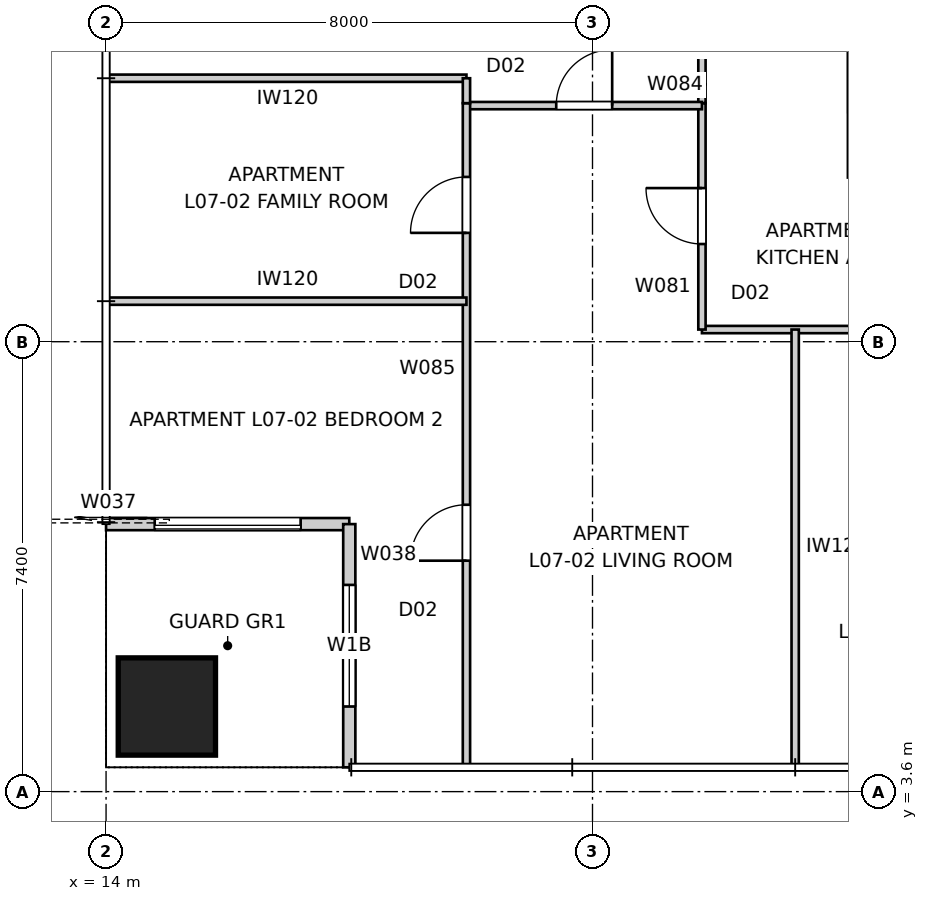
"""IFC4 building model, lengths in metres.
Left out: names, types, materials, properties, quantities, classifications, styles, units other than length and angle.
Written with IfcOpenShell. Run it as: python <this file> out.ifc"""

import sys

from ifc_helpers import new_model, si_unit, direction, frame, frame_2d, origin, origin_2d, place, context, subcontext, project, spatial, rectangle, extrude, element, fill, save


model = new_model("IFC4")
c1 = context("Model", 3, precision=1e-05, world=origin(), true_north=direction((0.0, 1.0)))
c2 = subcontext(c1, "Body", "Model", "MODEL_VIEW")
j1 = project(units=[si_unit("LENGTHUNIT", "METRE"), si_unit("PLANEANGLEUNIT", "RADIAN")], contexts=[c1])
p1 = place(None, origin())
s1 = spatial("IfcSite", under=j1, at=p1, CompositionType="ELEMENT")
p2 = place(p1, origin())
s2 = spatial("IfcBuilding", under=s1, at=p2, CompositionType="ELEMENT")
p3 = place(p2, frame((0.0, 0.0, 28.6)))
s3 = spatial("IfcBuildingStorey", under=s2, at=p3, CompositionType="ELEMENT", Elevation=28.6)
p4 = place(p3, frame((15.0, 5.0, 0.0), z_axis=(0.0, 0.0, 1.0), x_axis=(1.0, 0.0, 0.0)))
e1 = element("IfcColumn", 1, at=p4, inside=s3, PredefinedType="COLUMN", context=c2, shape_type="SweptSolid", body=[
    extrude(rectangle(XDim=1.6, YDim=1.6, at=origin_2d()), origin(), (0.0, 0.0, 1.0), 3.4),
])
p5 = place(p3, frame((14.0, 8.0, 0.0), z_axis=(0.0, 0.0, 1.0), x_axis=(1.0, 0.0, 0.0)))
e2 = element("IfcWall", 2, at=p5, inside=s3, PredefinedType="SOLIDWALL", context=c2, shape_type="SweptSolid", body=[
    extrude(rectangle(XDim=4.0, YDim=0.2, at=frame_2d((2.0, 0.0))), origin(), (0.0, 0.0, 1.0), 3.25),
])
p6 = place(p5, frame((0.8, 0.0, 0.0)))
e3 = element("IfcOpeningElement", 3, at=p6, cuts=e2, PredefinedType="OPENING", context=c2, shape_type="SweptSolid", body=[
    extrude(rectangle(XDim=2.4, YDim=2.1, at=frame_2d((1.2, 1.05))), frame((0.0, 0.11, 0.0), z_axis=(0.0, -1.0, 0.0), x_axis=(1.0, 0.0, 0.0)), (0.0, 0.0, 1.0), 0.22),
])
p7 = place(p3, frame((18.0, 8.0, 0.0), z_axis=(0.0, 0.0, 1.0), x_axis=(0.0, -1.0, 0.0)))
e4 = element("IfcWall", 4, at=p7, inside=s3, PredefinedType="SOLIDWALL", context=c2, shape_type="SweptSolid", body=[
    extrude(rectangle(XDim=4.0, YDim=0.2, at=frame_2d((2.0, 0.0))), origin(), (0.0, 0.0, 1.0), 3.25),
])
p8 = place(p7, frame((1.0, 0.0, 0.45)))
e5 = element("IfcOpeningElement", 5, at=p8, cuts=e4, PredefinedType="OPENING", context=c2, shape_type="SweptSolid", body=[
    extrude(rectangle(XDim=2.0, YDim=1.8, at=frame_2d((1.0, 0.9))), frame((0.0, 0.11, 0.0), z_axis=(0.0, -1.0, 0.0), x_axis=(1.0, 0.0, 0.0)), (0.0, 0.0, 1.0), 0.22),
])
p9 = place(p3, frame((26.3, 46.3, 0.0), z_axis=(0.0, 0.0, 1.0), x_axis=(0.0, -1.0, 0.0)))
e6 = element("IfcWall", 6, at=p9, inside=s3, PredefinedType="PARTITIONING", context=c2, shape_type="SweptSolid", body=[
    extrude(rectangle(XDim=32.6, YDim=0.2, at=frame_2d((16.3, 0.0))), origin(), (0.0, 0.0, 1.0), 3.25),
])
p10 = place(p9, frame((2.315, 0.0, 0.0)))
e7 = element("IfcOpeningElement", 7, at=p10, cuts=e6, PredefinedType="OPENING", context=c2, shape_type="SweptSolid", body=[
    extrude(rectangle(XDim=1.02, YDim=2.34, at=frame_2d((0.51, 1.17))), frame((0.0, 0.11, 0.0), z_axis=(0.0, -1.0, 0.0), x_axis=(1.0, 0.0, 0.0)), (0.0, 0.0, 1.0), 0.22),
])
p11 = place(p9, frame((10.624, 0.0, 0.0)))
e8 = element("IfcOpeningElement", 8, at=p11, cuts=e6, PredefinedType="OPENING", context=c2, shape_type="SweptSolid", body=[
    extrude(rectangle(XDim=1.02, YDim=2.34, at=frame_2d((0.51, 1.17))), frame((0.0, 0.11, 0.0), z_axis=(0.0, -1.0, 0.0), x_axis=(1.0, 0.0, 0.0)), (0.0, 0.0, 1.0), 0.22),
])
p12 = place(p9, frame((17.848, 0.0, 0.0)))
e9 = element("IfcOpeningElement", 9, at=p12, cuts=e6, PredefinedType="OPENING", context=c2, shape_type="SweptSolid", body=[
    extrude(rectangle(XDim=1.02, YDim=2.34, at=frame_2d((0.51, 1.17))), frame((0.0, 0.11, 0.0), z_axis=(0.0, -1.0, 0.0), x_axis=(1.0, 0.0, 0.0)), (0.0, 0.0, 1.0), 0.22),
])
p13 = place(p9, frame((30.516, 0.0, 0.0)))
e10 = element("IfcOpeningElement", 10, at=p13, cuts=e6, PredefinedType="OPENING", context=c2, shape_type="SweptSolid", body=[
    extrude(rectangle(XDim=1.02, YDim=2.34, at=frame_2d((0.51, 1.17))), frame((0.0, 0.11, 0.0), z_axis=(0.0, -1.0, 0.0), x_axis=(1.0, 0.0, 0.0)), (0.0, 0.0, 1.0), 0.22),
])
p14 = place(p3, frame((56.2, 11.2, 0.0), z_axis=(0.0, 0.0, 1.0), x_axis=(-1.0, 0.0, 0.0)))
e11 = element("IfcWall", 11, at=p14, inside=s3, PredefinedType="PARTITIONING", context=c2, shape_type="SweptSolid", body=[
    extrude(rectangle(XDim=32.4, YDim=0.12, at=frame_2d((16.2, 0.0))), origin(), (0.0, 0.0, 1.0), 3.25),
])
p15 = place(p14, frame((24.882, 0.0, 0.0)))
e12 = element("IfcOpeningElement", 12, at=p15, cuts=e11, PredefinedType="OPENING", context=c2, shape_type="SweptSolid", body=[
    extrude(rectangle(XDim=0.92, YDim=2.34, at=frame_2d((0.46, 1.17))), frame((0.0, 0.07, 0.0), z_axis=(0.0, -1.0, 0.0), x_axis=(1.0, 0.0, 0.0)), (0.0, 0.0, 1.0), 0.14),
])
p16 = place(p14, frame((22.477, 0.0, 0.0)))
e13 = element("IfcOpeningElement", 13, at=p16, cuts=e11, PredefinedType="OPENING", context=c2, shape_type="SweptSolid", body=[
    extrude(rectangle(XDim=0.92, YDim=2.34, at=frame_2d((0.46, 1.17))), frame((0.0, 0.07, 0.0), z_axis=(0.0, -1.0, 0.0), x_axis=(1.0, 0.0, 0.0)), (0.0, 0.0, 1.0), 0.14),
])
p17 = place(p14, frame((6.598, 0.0, 0.0)))
e14 = element("IfcOpeningElement", 14, at=p17, cuts=e11, PredefinedType="OPENING", context=c2, shape_type="SweptSolid", body=[
    extrude(rectangle(XDim=0.92, YDim=2.34, at=frame_2d((0.46, 1.17))), frame((0.0, 0.07, 0.0), z_axis=(0.0, -1.0, 0.0), x_axis=(1.0, 0.0, 0.0)), (0.0, 0.0, 1.0), 0.14),
])
p18 = place(p14, frame((28.598, 0.0, 0.0)))
e15 = element("IfcOpeningElement", 15, at=p18, cuts=e11, PredefinedType="OPENING", context=c2, shape_type="SweptSolid", body=[
    extrude(rectangle(XDim=0.92, YDim=2.34, at=frame_2d((0.46, 1.17))), frame((0.0, 0.07, 0.0), z_axis=(0.0, -1.0, 0.0), x_axis=(1.0, 0.0, 0.0)), (0.0, 0.0, 1.0), 0.14),
])
p19 = place(p14, frame((2.862, 0.0, 0.0)))
e16 = element("IfcOpeningElement", 16, at=p19, cuts=e11, PredefinedType="OPENING", context=c2, shape_type="SweptSolid", body=[
    extrude(rectangle(XDim=0.96, YDim=2.1, at=frame_2d((0.48, 1.05))), frame((0.0, 0.07, 0.0), z_axis=(0.0, -1.0, 0.0), x_axis=(1.0, 0.0, 0.0)), (0.0, 0.0, 1.0), 0.14),
])
p20 = place(p14, frame((10.363, 0.0, 0.0)))
e17 = element("IfcOpeningElement", 17, at=p20, cuts=e11, PredefinedType="OPENING", context=c2, shape_type="SweptSolid", body=[
    extrude(rectangle(XDim=0.96, YDim=2.1, at=frame_2d((0.48, 1.05))), frame((0.0, 0.07, 0.0), z_axis=(0.0, -1.0, 0.0), x_axis=(1.0, 0.0, 0.0)), (0.0, 0.0, 1.0), 0.14),
])
p21 = place(p14, frame((13.862, 0.0, 0.0)))
e18 = element("IfcOpeningElement", 18, at=p21, cuts=e11, PredefinedType="OPENING", context=c2, shape_type="SweptSolid", body=[
    extrude(rectangle(XDim=0.96, YDim=2.1, at=frame_2d((0.48, 1.05))), frame((0.0, 0.07, 0.0), z_axis=(0.0, -1.0, 0.0), x_axis=(1.0, 0.0, 0.0)), (0.0, 0.0, 1.0), 0.14),
])
p22 = place(p14, frame((17.529, 0.0, 0.0)))
e19 = element("IfcOpeningElement", 19, at=p22, cuts=e11, PredefinedType="OPENING", context=c2, shape_type="SweptSolid", body=[
    extrude(rectangle(XDim=0.96, YDim=2.1, at=frame_2d((0.48, 1.05))), frame((0.0, 0.07, 0.0), z_axis=(0.0, -1.0, 0.0), x_axis=(1.0, 0.0, 0.0)), (0.0, 0.0, 1.0), 0.14),
])
p23 = place(p3, frame((23.8, 11.2, 0.0), z_axis=(0.0, 0.0, 1.0), x_axis=(0.0, 1.0, 0.0)))
e20 = element("IfcWall", 20, at=p23, inside=s3, PredefinedType="PARTITIONING", context=c2, shape_type="SweptSolid", body=[
    extrude(rectangle(XDim=3.723, YDim=0.12, at=frame_2d((1.862, 0.0))), origin(), (0.0, 0.0, 1.0), 3.25),
])
p24 = place(p23, frame((1.407, 0.0, 0.0)))
e21 = element("IfcOpeningElement", 21, at=p24, cuts=e20, PredefinedType="OPENING", context=c2, shape_type="SweptSolid", body=[
    extrude(rectangle(XDim=0.92, YDim=2.34, at=frame_2d((0.46, 1.17))), frame((0.0, 0.07, 0.0), z_axis=(0.0, -1.0, 0.0), x_axis=(1.0, 0.0, 0.0)), (0.0, 0.0, 1.0), 0.14),
])
p25 = place(p3, frame((23.8, 15.233, 0.0), z_axis=(0.0, 0.0, 1.0), x_axis=(0.0, 1.0, 0.0)))
e22 = element("IfcWall", 22, at=p25, inside=s3, PredefinedType="PARTITIONING", context=c2, shape_type="SweptSolid", body=[
    extrude(rectangle(XDim=3.767, YDim=0.12, at=frame_2d((1.883, 0.0))), origin(), (0.0, 0.0, 1.0), 3.25),
])
p26 = place(p3, frame((19.927, 14.883, 0.0), z_axis=(0.0, 0.0, 1.0), x_axis=(1.0, 0.0, 0.0)))
e23 = element("IfcWall", 23, at=p26, inside=s3, PredefinedType="PARTITIONING", context=c2, shape_type="SweptSolid", body=[
    extrude(rectangle(XDim=3.873, YDim=0.12, at=frame_2d((1.937, 0.0))), origin(), (0.0, 0.0, 1.0), 3.25),
])
p27 = place(p26, frame((1.477, 0.0, 0.0)))
e24 = element("IfcOpeningElement", 24, at=p27, cuts=e23, PredefinedType="OPENING", context=c2, shape_type="SweptSolid", body=[
    extrude(rectangle(XDim=0.92, YDim=2.34, at=frame_2d((0.46, 1.17))), frame((0.0, 0.07, 0.0), z_axis=(0.0, -1.0, 0.0), x_axis=(1.0, 0.0, 0.0)), (0.0, 0.0, 1.0), 0.14),
])
p28 = place(p3, frame((19.927, 4.04, 0.0), z_axis=(0.0, 0.0, 1.0), x_axis=(0.0, 1.0, 0.0)))
e25 = element("IfcWall", 25, at=p28, inside=s3, PredefinedType="PARTITIONING", context=c2, shape_type="SweptSolid", body=[
    extrude(rectangle(XDim=10.883, YDim=0.12, at=frame_2d((5.442, 0.0))), origin(), (0.0, 0.0, 1.0), 3.25),
])
p29 = place(p28, frame((3.358, 0.0, 0.0)))
e26 = element("IfcOpeningElement", 26, at=p29, cuts=e25, PredefinedType="OPENING", context=c2, shape_type="SweptSolid", body=[
    extrude(rectangle(XDim=0.92, YDim=2.34, at=frame_2d((0.46, 1.17))), frame((0.0, 0.07, 0.0), z_axis=(0.0, -1.0, 0.0), x_axis=(1.0, 0.0, 0.0)), (0.0, 0.0, 1.0), 0.14),
])
p30 = place(p28, frame((8.75, 0.0, 0.0)))
e27 = element("IfcOpeningElement", 27, at=p30, cuts=e25, PredefinedType="OPENING", context=c2, shape_type="SweptSolid", body=[
    extrude(rectangle(XDim=0.92, YDim=2.34, at=frame_2d((0.46, 1.17))), frame((0.0, 0.07, 0.0), z_axis=(0.0, -1.0, 0.0), x_axis=(1.0, 0.0, 0.0)), (0.0, 0.0, 1.0), 0.14),
])
p31 = place(p3, frame((25.333, 11.2, 0.0), z_axis=(0.0, 0.0, 1.0), x_axis=(0.0, -1.0, 0.0)))
e28 = element("IfcWall", 28, at=p31, inside=s3, PredefinedType="PARTITIONING", context=c2, shape_type="SweptSolid", body=[
    extrude(rectangle(XDim=7.16, YDim=0.12, at=frame_2d((3.58, 0.0))), origin(), (0.0, 0.0, 1.0), 2.638),
])
p32 = place(p3, frame((19.927, 15.333, 0.0), z_axis=(0.0, 0.0, 1.0), x_axis=(-1.0, 0.0, 0.0)))
e29 = element("IfcWall", 29, at=p32, inside=s3, PredefinedType="PARTITIONING", context=c2, shape_type="SweptSolid", body=[
    extrude(rectangle(XDim=5.887, YDim=0.12, at=frame_2d((2.943, 0.0))), origin(), (0.0, 0.0, 1.0), 2.638),
])
p33 = place(p3, frame((14.04, 11.667, 0.0), z_axis=(0.0, 0.0, 1.0), x_axis=(1.0, 0.0, 0.0)))
e30 = element("IfcWall", 30, at=p33, inside=s3, PredefinedType="PARTITIONING", context=c2, shape_type="SweptSolid", body=[
    extrude(rectangle(XDim=5.887, YDim=0.12, at=frame_2d((2.943, 0.0))), origin(), (0.0, 0.0, 1.0), 3.25),
])
p34 = place(p3, frame((23.8, 15.233, 0.0), z_axis=(0.0, 0.0, 1.0), x_axis=(0.0, -1.0, 0.0)))
e31 = element("IfcWall", 31, at=p34, inside=s3, PredefinedType="PARTITIONING", context=c2, shape_type="SweptSolid", body=[
    extrude(rectangle(XDim=0.31, YDim=0.12, at=frame_2d((0.155, 0.0))), origin(), (0.0, 0.0, 1.0), 3.25),
])
p35 = place(p3, frame((19.927, 15.333, 0.0), z_axis=(0.0, 0.0, 1.0), x_axis=(0.0, -1.0, 0.0)))
e32 = element("IfcWall", 32, at=p35, inside=s3, PredefinedType="PARTITIONING", context=c2, shape_type="SweptSolid", body=[
    extrude(rectangle(XDim=0.41, YDim=0.12, at=frame_2d((0.205, 0.0))), origin(), (0.0, 0.0, 1.0), 3.25),
])
p36 = place(p6, origin())
e33 = element("IfcDoor", 33, at=p36, inside=s3, OperationType="SLIDING_TO_LEFT", PredefinedType="DOOR", context=c2, shape_type="SweptSolid", body=[
    extrude(rectangle(XDim=2.4, YDim=2.1, at=frame_2d((1.2, 1.05))), frame((0.0, 0.025, 0.0), z_axis=(0.0, -1.0, 0.0), x_axis=(1.0, 0.0, 0.0)), (0.0, 0.0, 1.0), 0.05),
])
fill(e3, e33)
p37 = place(p8, origin())
e34 = element("IfcWindow", 34, at=p37, inside=s3, PartitioningType="SINGLE_PANEL", PredefinedType="WINDOW", context=c2, shape_type="SweptSolid", body=[
    extrude(rectangle(XDim=2.0, YDim=1.8, at=frame_2d((1.0, 0.9))), frame((0.0, 0.03, 0.0), z_axis=(0.0, -1.0, 0.0), x_axis=(1.0, 0.0, 0.0)), (0.0, 0.0, 1.0), 0.06),
])
fill(e5, e34)
p38 = place(p24, origin())
e35 = element("IfcDoor", 35, at=p38, inside=s3, OperationType="SINGLE_SWING_RIGHT", PredefinedType="DOOR", context=c2, shape_type="SweptSolid", body=[
    extrude(rectangle(XDim=0.92, YDim=2.34, at=frame_2d((0.46, 1.17))), frame((0.0, 0.025, 0.0), z_axis=(0.0, -1.0, 0.0), x_axis=(1.0, 0.0, 0.0)), (0.0, 0.0, 1.0), 0.05),
])
fill(e21, e35)
p39 = place(p29, origin())
e36 = element("IfcDoor", 36, at=p39, inside=s3, OperationType="SINGLE_SWING_LEFT", PredefinedType="DOOR", context=c2, shape_type="SweptSolid", body=[
    extrude(rectangle(XDim=0.92, YDim=2.34, at=frame_2d((0.46, 1.17))), frame((0.0, 0.025, 0.0), z_axis=(0.0, -1.0, 0.0), x_axis=(1.0, 0.0, 0.0)), (0.0, 0.0, 1.0), 0.05),
])
fill(e26, e36)
p40 = place(p27, origin())
e37 = element("IfcDoor", 37, at=p40, inside=s3, OperationType="SINGLE_SWING_RIGHT", PredefinedType="DOOR", context=c2, shape_type="SweptSolid", body=[
    extrude(rectangle(XDim=0.92, YDim=2.34, at=frame_2d((0.46, 1.17))), frame((0.0, 0.025, 0.0), z_axis=(0.0, -1.0, 0.0), x_axis=(1.0, 0.0, 0.0)), (0.0, 0.0, 1.0), 0.05),
])
fill(e24, e37)
p41 = place(p30, origin())
e38 = element("IfcDoor", 38, at=p41, inside=s3, OperationType="SINGLE_SWING_LEFT", PredefinedType="DOOR", context=c2, shape_type="SweptSolid", body=[
    extrude(rectangle(XDim=0.92, YDim=2.34, at=frame_2d((0.46, 1.17))), frame((0.0, 0.025, 0.0), z_axis=(0.0, -1.0, 0.0), x_axis=(1.0, 0.0, 0.0)), (0.0, 0.0, 1.0), 0.05),
])
fill(e27, e38)
save(model, sys.argv[1])
